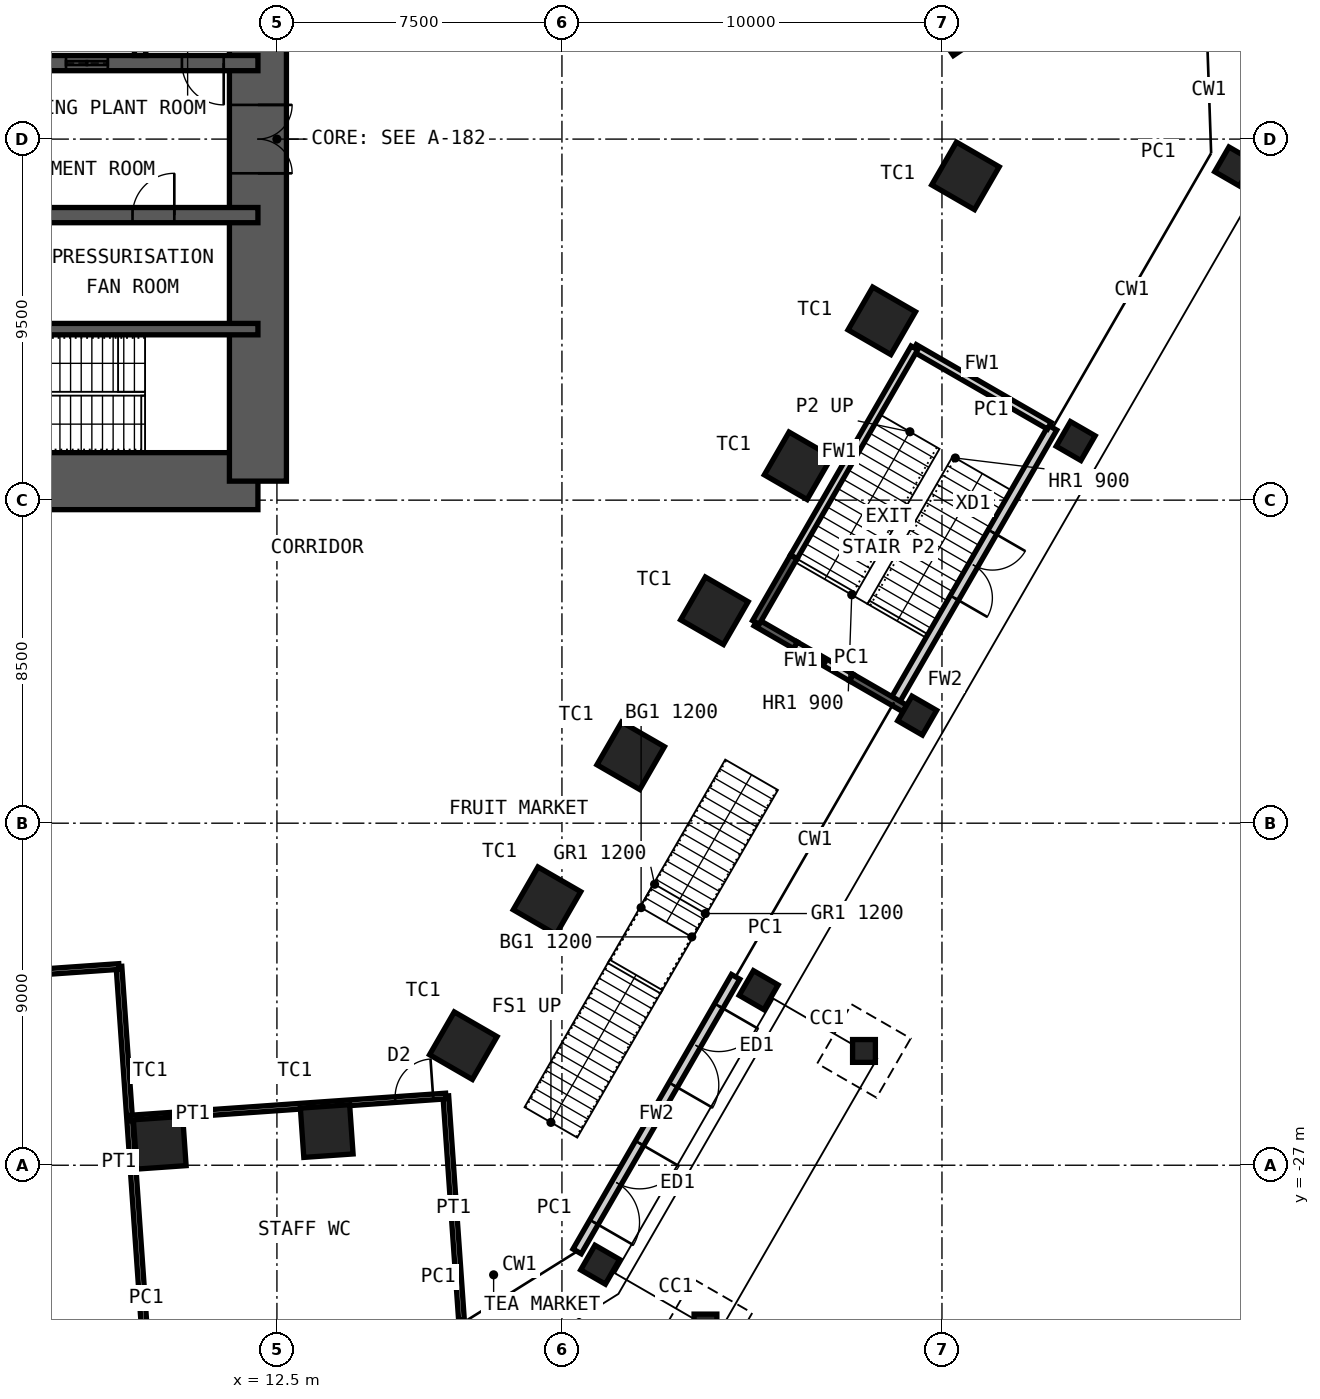
"""IFC4 building model, lengths in metres.
Left out: names, types, materials, properties, quantities, classifications, styles, units other than length and angle.
Written with IfcOpenShell. Run it as: python <this file> out.ifc"""

import sys

from ifc_helpers import new_model, si_unit, direction, frame, frame_2d, origin, origin_2d, place, context, subcontext, project, spatial, rectangle, hollow_rectangle, hollow_circle, extrude, element, fill, save


model = new_model("IFC4")
c1 = context("Model", 3, precision=1e-05, world=origin(), true_north=direction((0.0, 1.0)))
c2 = subcontext(c1, "Body", "Model", "MODEL_VIEW")
j1 = project(units=[si_unit("LENGTHUNIT", "METRE"), si_unit("PLANEANGLEUNIT", "RADIAN")], contexts=[c1])
p1 = place(None, origin())
s1 = spatial("IfcSite", under=j1, at=p1, CompositionType="ELEMENT")
p2 = place(p1, origin())
s2 = spatial("IfcBuilding", under=s1, at=p2, CompositionType="ELEMENT")
p3 = place(p2, origin())
s3 = spatial("IfcBuildingStorey", under=s2, at=p3, CompositionType="ELEMENT", Elevation=0.0)
for number, where, z_axis, x_axis in (
    (1, (30.476, 3.101, 0.0), (0.0, 0.0, 1.0), (-0.559, 0.829, 0.0)),
    (2, (30.618, -0.967, 0.0), (0.0, 0.0, 1.0), (0.5, 0.866, 0.0)),
    (3, (28.416, -4.782, 0.0), (0.0, 0.0, 1.0), (0.5, 0.866, 0.0)),
    (4, (26.214, -8.596, 0.0), (0.0, 0.0, 1.0), (0.5, 0.866, 0.0)),
    (5, (24.011, -12.411, 0.0), (0.0, 0.0, 1.0), (0.5, 0.866, 0.0)),
    (6, (21.809, -16.225, 0.0), (0.0, 0.0, 1.0), (0.5, 0.866, 0.0)),
    (7, (19.607, -20.04, 0.0), (0.0, 0.0, 1.0), (0.5, 0.866, 0.0)),
    (8, (17.405, -23.854, 0.0), (0.0, 0.0, 1.0), (0.5, 0.866, 0.0)),
    (9, (13.811, -26.1, 0.0), (0.0, 0.0, 1.0), (0.998, 0.07, 0.0)),
    (10, (9.417, -26.407, 0.0), (0.0, 0.0, 1.0), (0.998, 0.07, 0.0)),
):
    element("IfcColumn", number, at=place(p3, frame(where, z_axis=z_axis, x_axis=x_axis)), inside=s3, PredefinedType="COLUMN", context=c2, shape_type="SweptSolid", body=[
        extrude(hollow_rectangle(XDim=1.3, YDim=1.3, WallThickness=0.1, at=origin_2d()), origin(), (0.0, 0.0, 1.0), 6.0),
    ])
for number, where, z_axis, x_axis in (
    (11, (37.689, -0.72, 0.0), (0.0, 0.0, 1.0), (0.5, 0.866, 0.0)),
    (12, (33.518, -7.945, 0.0), (0.0, 0.0, 1.0), (0.5, 0.866, 0.0)),
    (13, (29.347, -15.169, 0.0), (0.0, 0.0, 1.0), (0.5, 0.866, 0.0)),
    (14, (25.177, -22.393, 0.0), (0.0, 0.0, 1.0), (0.5, 0.866, 0.0)),
    (15, (21.006, -29.617, 0.0), (0.0, 0.0, 1.0), (0.5, 0.866, 0.0)),
):
    element("IfcColumn", number, at=place(p3, frame(where, z_axis=z_axis, x_axis=x_axis)), inside=s3, PredefinedType="COLUMN", context=c2, shape_type="SweptSolid", body=[
        extrude(hollow_rectangle(XDim=0.75, YDim=0.75, WallThickness=0.036, at=origin_2d()), origin(), (0.0, 0.0, 1.0), 6.0),
    ])
p4 = place(p3, frame((-12.0, -9.0, 0.0), z_axis=(0.0, 0.0, 1.0), x_axis=(1.0, 0.0, 0.0)))
e16 = element("IfcWall", 16, at=p4, inside=s3, PredefinedType="SHEAR", context=c2, shape_type="SweptSolid", body=[
    extrude(rectangle(XDim=24.0, YDim=1.5, at=frame_2d((12.0, 0.0))), origin(), (0.0, 0.0, 1.0), 6.0),
])
p5 = place(p4, frame((1.35, 0.0, 0.0)))
e17 = element("IfcOpeningElement", 17, at=p5, cuts=e16, PredefinedType="OPENING", context=c2, shape_type="SweptSolid", body=[
    extrude(rectangle(XDim=1.0, YDim=2.1, at=frame_2d((0.5, 1.05))), frame((0.0, 0.76, 0.0), z_axis=(0.0, -1.0, 0.0), x_axis=(1.0, 0.0, 0.0)), (0.0, 0.0, 1.0), 1.52),
])
p6 = place(p4, frame((5.325, 0.0, 0.0)))
e18 = element("IfcOpeningElement", 18, at=p6, cuts=e16, PredefinedType="OPENING", context=c2, shape_type="SweptSolid", body=[
    extrude(rectangle(XDim=1.15, YDim=2.1, at=frame_2d((0.575, 1.05))), frame((0.0, 0.76, 0.0), z_axis=(0.0, -1.0, 0.0), x_axis=(1.0, 0.0, 0.0)), (0.0, 0.0, 1.0), 1.52),
])
p7 = place(p4, frame((12.6, 0.0, 0.0)))
e19 = element("IfcOpeningElement", 19, at=p7, cuts=e16, PredefinedType="OPENING", context=c2, shape_type="SweptSolid", body=[
    extrude(rectangle(XDim=1.0, YDim=2.1, at=frame_2d((0.5, 1.05))), frame((0.0, 0.76, 0.0), z_axis=(0.0, -1.0, 0.0), x_axis=(1.0, 0.0, 0.0)), (0.0, 0.0, 1.0), 1.52),
])
p8 = place(p3, frame((12.0, -9.0, 0.0), z_axis=(0.0, 0.0, 1.0), x_axis=(0.0, 1.0, 0.0)))
e20 = element("IfcWall", 20, at=p8, inside=s3, PredefinedType="SHEAR", context=c2, shape_type="SweptSolid", body=[
    extrude(rectangle(XDim=18.0, YDim=1.5, at=frame_2d((9.0, 0.0))), origin(), (0.0, 0.0, 1.0), 6.0),
])
p9 = place(p8, frame((8.1, 0.0, 0.0)))
e21 = element("IfcOpeningElement", 21, at=p9, cuts=e20, PredefinedType="OPENING", context=c2, shape_type="SweptSolid", body=[
    extrude(rectangle(XDim=1.8, YDim=2.1, at=frame_2d((0.9, 1.05))), frame((0.0, 0.76, 0.0), z_axis=(0.0, -1.0, 0.0), x_axis=(1.0, 0.0, 0.0)), (0.0, 0.0, 1.0), 1.52),
])
p10 = place(p3, frame((-12.0, 2.0, 0.0), z_axis=(0.0, 0.0, 1.0), x_axis=(1.0, 0.0, 0.0)))
e22 = element("IfcWall", 22, at=p10, inside=s3, PredefinedType="SHEAR", context=c2, shape_type="SweptSolid", body=[
    extrude(rectangle(XDim=24.0, YDim=0.4, at=frame_2d((12.0, 0.0))), origin(), (0.0, 0.0, 1.0), 6.0),
])
p11 = place(p10, frame((2.4, 0.0, 0.0)))
e23 = element("IfcOpeningElement", 23, at=p11, cuts=e22, PredefinedType="OPENING", context=c2, shape_type="SweptSolid", body=[
    extrude(rectangle(XDim=1.1, YDim=2.1, at=frame_2d((0.55, 1.05))), frame((0.0, 0.21, 0.0), z_axis=(0.0, -1.0, 0.0), x_axis=(1.0, 0.0, 0.0)), (0.0, 0.0, 1.0), 0.42),
])
p12 = place(p10, frame((22.0, 0.0, 0.0)))
e24 = element("IfcOpeningElement", 24, at=p12, cuts=e22, PredefinedType="OPENING", context=c2, shape_type="SweptSolid", body=[
    extrude(rectangle(XDim=1.1, YDim=2.1, at=frame_2d((0.55, 1.05))), frame((0.0, 0.21, 0.0), z_axis=(0.0, -1.0, 0.0), x_axis=(1.0, 0.0, 0.0)), (0.0, 0.0, 1.0), 0.42),
])
p13 = place(p10, frame((10.15, 0.0, 0.0)))
e25 = element("IfcOpeningElement", 25, at=p13, cuts=e22, PredefinedType="OPENING", context=c2, shape_type="SweptSolid", body=[
    extrude(rectangle(XDim=1.0, YDim=2.1, at=frame_2d((0.5, 1.05))), frame((0.0, 0.21, 0.0), z_axis=(0.0, -1.0, 0.0), x_axis=(1.0, 0.0, 0.0)), (0.0, 0.0, 1.0), 0.42),
])
p14 = place(p10, frame((6.7, 0.0, 0.0)))
e26 = element("IfcOpeningElement", 26, at=p14, cuts=e22, PredefinedType="OPENING", context=c2, shape_type="SweptSolid", body=[
    extrude(rectangle(XDim=1.4, YDim=2.4, at=frame_2d((0.7, 1.2))), frame((0.0, 0.21, 0.0), z_axis=(0.0, -1.0, 0.0), x_axis=(1.0, 0.0, 0.0)), (0.0, 0.0, 1.0), 0.42),
])
p15 = place(p10, frame((13.35, 0.0, 0.0)))
e27 = element("IfcOpeningElement", 27, at=p15, cuts=e22, PredefinedType="OPENING", context=c2, shape_type="SweptSolid", body=[
    extrude(rectangle(XDim=1.1, YDim=2.4, at=frame_2d((0.55, 1.2))), frame((0.0, 0.21, 0.0), z_axis=(0.0, -1.0, 0.0), x_axis=(1.0, 0.0, 0.0)), (0.0, 0.0, 1.0), 0.42),
])
p16 = place(p10, frame((16.15, 0.0, 0.0)))
e28 = element("IfcOpeningElement", 28, at=p16, cuts=e22, PredefinedType="OPENING", context=c2, shape_type="SweptSolid", body=[
    extrude(rectangle(XDim=1.1, YDim=2.4, at=frame_2d((0.55, 1.2))), frame((0.0, 0.21, 0.0), z_axis=(0.0, -1.0, 0.0), x_axis=(1.0, 0.0, 0.0)), (0.0, 0.0, 1.0), 0.42),
])
p17 = place(p10, frame((18.95, 0.0, 0.0)))
e29 = element("IfcOpeningElement", 29, at=p17, cuts=e22, PredefinedType="OPENING", context=c2, shape_type="SweptSolid", body=[
    extrude(rectangle(XDim=1.1, YDim=2.4, at=frame_2d((0.55, 1.2))), frame((0.0, 0.21, 0.0), z_axis=(0.0, -1.0, 0.0), x_axis=(1.0, 0.0, 0.0)), (0.0, 0.0, 1.0), 0.42),
])
p18 = place(p3, frame((-12.0, -2.0, 0.0), z_axis=(0.0, 0.0, 1.0), x_axis=(1.0, 0.0, 0.0)))
e30 = element("IfcWall", 30, at=p18, inside=s3, PredefinedType="SHEAR", context=c2, shape_type="SweptSolid", body=[
    extrude(rectangle(XDim=24.0, YDim=0.4, at=frame_2d((12.0, 0.0))), origin(), (0.0, 0.0, 1.0), 6.0),
])
p19 = place(p18, frame((1.1, 0.0, 0.0)))
e31 = element("IfcOpeningElement", 31, at=p19, cuts=e30, PredefinedType="OPENING", context=c2, shape_type="SweptSolid", body=[
    extrude(rectangle(XDim=1.1, YDim=2.1, at=frame_2d((0.55, 1.05))), frame((0.0, 0.21, 0.0), z_axis=(0.0, -1.0, 0.0), x_axis=(1.0, 0.0, 0.0)), (0.0, 0.0, 1.0), 0.42),
])
p20 = place(p18, frame((13.55, 0.0, 0.0)))
e32 = element("IfcOpeningElement", 32, at=p20, cuts=e30, PredefinedType="OPENING", context=c2, shape_type="SweptSolid", body=[
    extrude(rectangle(XDim=1.1, YDim=2.1, at=frame_2d((0.55, 1.05))), frame((0.0, 0.21, 0.0), z_axis=(0.0, -1.0, 0.0), x_axis=(1.0, 0.0, 0.0)), (0.0, 0.0, 1.0), 0.42),
])
p21 = place(p18, frame((20.7, 0.0, 0.0)))
e33 = element("IfcOpeningElement", 33, at=p21, cuts=e30, PredefinedType="OPENING", context=c2, shape_type="SweptSolid", body=[
    extrude(rectangle(XDim=1.1, YDim=2.1, at=frame_2d((0.55, 1.05))), frame((0.0, 0.21, 0.0), z_axis=(0.0, -1.0, 0.0), x_axis=(1.0, 0.0, 0.0)), (0.0, 0.0, 1.0), 0.42),
])
p22 = place(p18, frame((3.95, 0.0, 0.0)))
e34 = element("IfcOpeningElement", 34, at=p22, cuts=e30, PredefinedType="OPENING", context=c2, shape_type="SweptSolid", body=[
    extrude(rectangle(XDim=1.1, YDim=2.4, at=frame_2d((0.55, 1.2))), frame((0.0, 0.21, 0.0), z_axis=(0.0, -1.0, 0.0), x_axis=(1.0, 0.0, 0.0)), (0.0, 0.0, 1.0), 0.42),
])
p23 = place(p18, frame((6.75, 0.0, 0.0)))
e35 = element("IfcOpeningElement", 35, at=p23, cuts=e30, PredefinedType="OPENING", context=c2, shape_type="SweptSolid", body=[
    extrude(rectangle(XDim=1.1, YDim=2.4, at=frame_2d((0.55, 1.2))), frame((0.0, 0.21, 0.0), z_axis=(0.0, -1.0, 0.0), x_axis=(1.0, 0.0, 0.0)), (0.0, 0.0, 1.0), 0.42),
])
p24 = place(p18, frame((9.55, 0.0, 0.0)))
e36 = element("IfcOpeningElement", 36, at=p24, cuts=e30, PredefinedType="OPENING", context=c2, shape_type="SweptSolid", body=[
    extrude(rectangle(XDim=1.1, YDim=2.4, at=frame_2d((0.55, 1.2))), frame((0.0, 0.21, 0.0), z_axis=(0.0, -1.0, 0.0), x_axis=(1.0, 0.0, 0.0)), (0.0, 0.0, 1.0), 0.42),
])
p25 = place(p3, frame((-12.0, -5.0, 0.0), z_axis=(0.0, 0.0, 1.0), x_axis=(1.0, 0.0, 0.0)))
e37 = element("IfcWall", 37, at=p25, inside=s3, PredefinedType="SHEAR", context=c2, shape_type="SweptSolid", body=[
    extrude(rectangle(XDim=24.0, YDim=0.3, at=frame_2d((12.0, 0.0))), origin(), (0.0, 0.0, 1.0), 6.0),
])
p26 = place(p3, frame((8.9, 2.2, 0.0), z_axis=(0.0, 0.0, 1.0), x_axis=(0.0, 1.0, 0.0)))
e38 = element("IfcWall", 38, at=p26, inside=s3, PredefinedType="PARTITIONING", context=c2, shape_type="SweptSolid", body=[
    extrude(rectangle(XDim=2.65, YDim=0.3, at=frame_2d((1.325, 0.0))), origin(), (0.0, 0.0, 1.0), 5.78),
])
p27 = place(p3, frame((32.912, -7.595, 0.0), z_axis=(0.0, 0.0, 1.0), x_axis=(-0.500004511595, -0.866022798998, 0.0)))
e39 = element("IfcWall", 39, at=p27, inside=s3, PredefinedType="SOLIDWALL", context=c2, shape_type="SweptSolid", body=[
    extrude(rectangle(XDim=8.342, YDim=0.25, at=frame_2d((4.171, 0.0))), origin(), (0.0, 0.0, 1.0), 5.75),
])
p28 = place(p27, frame((3.171, 0.0, 0.0)))
e40 = element("IfcOpeningElement", 40, at=p28, cuts=e39, PredefinedType="OPENING", context=c2, shape_type="SweptSolid", body=[
    extrude(rectangle(XDim=2.0, YDim=2.4, at=frame_2d((1.0, 1.2))), frame((0.0, 0.135, 0.0), z_axis=(0.0, -1.0, 0.0), x_axis=(1.0, 0.0, 0.0)), (0.0, 0.0, 1.0), 0.27),
])
p29 = place(p3, frame((24.57, -22.043, 0.0), z_axis=(0.0, 0.0, 1.0), x_axis=(-0.500004511595, -0.866022798998, 0.0)))
e41 = element("IfcWall", 41, at=p29, inside=s3, PredefinedType="SOLIDWALL", context=c2, shape_type="SweptSolid", body=[
    extrude(rectangle(XDim=8.342, YDim=0.25, at=frame_2d((4.171, 0.0))), origin(), (0.0, 0.0, 1.0), 5.75),
])
p30 = place(p29, frame((0.885, 0.0, 0.0)))
e42 = element("IfcOpeningElement", 42, at=p30, cuts=e41, PredefinedType="OPENING", context=c2, shape_type="SweptSolid", body=[
    extrude(rectangle(XDim=2.4, YDim=3.0, at=frame_2d((1.2, 1.5))), frame((0.0, 0.135, 0.0), z_axis=(0.0, -1.0, 0.0), x_axis=(1.0, 0.0, 0.0)), (0.0, 0.0, 1.0), 0.27),
])
p31 = place(p29, frame((5.056, 0.0, 0.0)))
e43 = element("IfcOpeningElement", 43, at=p31, cuts=e41, PredefinedType="OPENING", context=c2, shape_type="SweptSolid", body=[
    extrude(rectangle(XDim=2.4, YDim=3.0, at=frame_2d((1.2, 1.5))), frame((0.0, 0.135, 0.0), z_axis=(0.0, -1.0, 0.0), x_axis=(1.0, 0.0, 0.0)), (0.0, 0.0, 1.0), 0.27),
])
p32 = place(p3, frame((9.034, -31.647, 0.0), z_axis=(0.0, 0.0, 1.0), x_axis=(-0.069739801019, 0.99756521599, 0.0)))
e44 = element("IfcWall", 44, at=p32, inside=s3, PredefinedType="PARTITIONING", context=c2, shape_type="SweptSolid", body=[
    extrude(rectangle(XDim=9.9, YDim=0.15, at=frame_2d((4.95, 0.0))), origin(), (0.0, 0.0, 1.0), 4.65),
])
p33 = place(p3, frame((8.344, -21.771, 0.0), z_axis=(0.0, 0.0, 1.0), x_axis=(-0.997563959397, -0.069757773133, 0.0)))
e45 = element("IfcWall", 45, at=p33, inside=s3, PredefinedType="PARTITIONING", context=c2, shape_type="SweptSolid", body=[
    extrude(rectangle(XDim=16.684, YDim=0.15, at=frame_2d((8.342, 0.0))), origin(), (0.0, 0.0, 1.0), 5.75),
])
p34 = place(p33, frame((7.442, 0.0, 0.0)))
e46 = element("IfcOpeningElement", 46, at=p34, cuts=e45, PredefinedType="OPENING", context=c2, shape_type="SweptSolid", body=[
    extrude(rectangle(XDim=1.8, YDim=2.4, at=frame_2d((0.9, 1.2))), frame((0.0, 0.085, 0.0), z_axis=(0.0, -1.0, 0.0), x_axis=(1.0, 0.0, 0.0)), (0.0, 0.0, 1.0), 0.17),
])
p35 = place(p3, frame((17.356, -31.065, 0.0), z_axis=(0.0, 0.0, 1.0), x_axis=(-0.069767771051, 0.997563260211, 0.0)))
e47 = element("IfcWall", 47, at=p35, inside=s3, PredefinedType="PARTITIONING", context=c2, shape_type="SweptSolid", body=[
    extrude(rectangle(XDim=5.9, YDim=0.15, at=frame_2d((2.95, 0.0))), origin(), (0.0, 0.0, 1.0), 5.75),
])
p36 = place(p3, frame((16.944, -25.179, 0.0), z_axis=(0.0, 0.0, 1.0), x_axis=(-0.997564977604, -0.069743210844, 0.0)))
e48 = element("IfcWall", 48, at=p36, inside=s3, PredefinedType="PARTITIONING", context=c2, shape_type="SweptSolid", body=[
    extrude(rectangle(XDim=8.342, YDim=0.15, at=frame_2d((4.171, 0.0))), origin(), (0.0, 0.0, 1.0), 5.75),
])
p37 = place(p36, frame((0.334, 0.0, 0.0)))
e49 = element("IfcOpeningElement", 49, at=p37, cuts=e48, PredefinedType="OPENING", context=c2, shape_type="SweptSolid", body=[
    extrude(rectangle(XDim=1.0, YDim=2.4, at=frame_2d((0.5, 1.2))), frame((0.0, 0.085, 0.0), z_axis=(0.0, -1.0, 0.0), x_axis=(1.0, 0.0, 0.0)), (0.0, 0.0, 1.0), 0.17),
])
p38 = place(p3, frame((32.825, -7.545, 0.0), z_axis=(0.0, 0.0, 1.0), x_axis=(-0.8660249478, 0.500000789788, 0.0)))
e50 = element("IfcWall", 50, at=p38, inside=s3, PredefinedType="PARTITIONING", context=c2, shape_type="SweptSolid", body=[
    extrude(rectangle(XDim=4.1, YDim=0.2, at=frame_2d((2.05, 0.0))), origin(), (0.0, 0.0, 1.0), 5.75),
])
p39 = place(p3, frame((29.023, -14.981, 0.0), z_axis=(0.0, 0.0, 1.0), x_axis=(-0.866015446554, 0.500017246033, 0.0)))
e51 = element("IfcWall", 51, at=p39, inside=s3, PredefinedType="PARTITIONING", context=c2, shape_type="SweptSolid", body=[
    extrude(rectangle(XDim=1.625, YDim=0.2, at=frame_2d((0.812, 0.0))), origin(), (0.0, 0.0, 1.0), 5.75),
])
p40 = place(p3, frame((29.275, -5.495, 0.0), z_axis=(0.0, 0.0, 1.0), x_axis=(-0.499976503915, -0.866038968831, 0.0)))
e52 = element("IfcWall", 52, at=p40, inside=s3, PredefinedType="PARTITIONING", context=c2, shape_type="SweptSolid", body=[
    extrude(rectangle(XDim=6.35, YDim=0.2, at=frame_2d((3.175, 0.0))), origin(), (0.0, 0.0, 1.0), 5.75),
])
p41 = place(p3, frame((27.615, -14.169, 0.0), z_axis=(0.0, 0.0, 1.0), x_axis=(-0.866087547558, 0.499892348375, 0.0)))
e53 = element("IfcWall", 53, at=p41, inside=s3, PredefinedType="PARTITIONING", context=c2, shape_type="SweptSolid", body=[
    extrude(rectangle(XDim=1.7, YDim=0.2, at=frame_2d((0.85, 0.0))), origin(), (0.0, 0.0, 1.0), 5.75),
])
p42 = place(p3, frame((26.143, -13.319, 0.0), z_axis=(0.0, 0.0, 1.0), x_axis=(-0.865955154139, 0.50012165622, 0.0)))
e54 = element("IfcWall", 54, at=p42, inside=s3, PredefinedType="PARTITIONING", context=c2, shape_type="SweptSolid", body=[
    extrude(rectangle(XDim=1.2, YDim=0.2, at=frame_2d((0.6, 0.0))), origin(), (0.0, 0.0, 1.0), 5.75),
])
p43 = place(p3, frame((26.1, -10.994, 0.0), z_axis=(0.0, 0.0, 1.0), x_axis=(-0.500001870701, -0.866024323732, 0.0)))
e55 = element("IfcWall", 55, at=p43, inside=s3, PredefinedType="PARTITIONING", context=c2, shape_type="SweptSolid", body=[
    extrude(rectangle(XDim=1.992, YDim=0.2, at=frame_2d((0.996, 0.0))), origin(), (0.0, 0.0, 1.0), 5.75),
])
for number, where, z_axis, x_axis in (
    (56, (27.948, -23.993, -0.3), (0.0, 0.0, 1.0), (1.0, 0.0, 0.0)),
    (57, (23.777, -31.217, -0.3), (0.0, 0.0, 1.0), (1.0, 0.0, 0.0)),
):
    element("IfcColumn", number, at=place(p3, frame(where, z_axis=z_axis, x_axis=x_axis)), inside=s3, PredefinedType="COLUMN", context=c2, shape_type="SweptSolid", body=[
        extrude(hollow_circle(Radius=0.162, WallThickness=0.012, at=origin_2d()), origin(), (0.0, 0.0, 1.0), 4.46),
    ])
p44 = place(p28, origin())
e58 = element("IfcDoor", 58, at=p44, inside=s3, OperationType="DOUBLE_DOOR_DOUBLE_SWING", PredefinedType="DOOR", context=c2, shape_type="SweptSolid", body=[
    extrude(rectangle(XDim=2.0, YDim=2.4, at=frame_2d((1.0, 1.2))), frame((0.0, 0.025, 0.0), z_axis=(0.0, -1.0, 0.0), x_axis=(1.0, 0.0, 0.0)), (0.0, 0.0, 1.0), 0.05),
])
fill(e40, e58)
p45 = place(p30, origin())
e59 = element("IfcDoor", 59, at=p45, inside=s3, OperationType="DOUBLE_DOOR_DOUBLE_SWING", PredefinedType="DOOR", context=c2, shape_type="SweptSolid", body=[
    extrude(rectangle(XDim=2.4, YDim=3.0, at=frame_2d((1.2, 1.5))), frame((0.0, 0.025, 0.0), z_axis=(0.0, -1.0, 0.0), x_axis=(1.0, 0.0, 0.0)), (0.0, 0.0, 1.0), 0.05),
])
fill(e42, e59)
p46 = place(p31, origin())
e60 = element("IfcDoor", 60, at=p46, inside=s3, OperationType="DOUBLE_DOOR_DOUBLE_SWING", PredefinedType="DOOR", context=c2, shape_type="SweptSolid", body=[
    extrude(rectangle(XDim=2.4, YDim=3.0, at=frame_2d((1.2, 1.5))), frame((0.0, 0.025, 0.0), z_axis=(0.0, -1.0, 0.0), x_axis=(1.0, 0.0, 0.0)), (0.0, 0.0, 1.0), 0.05),
])
fill(e43, e60)
p47 = place(p12, origin())
e61 = element("IfcDoor", 61, at=p47, inside=s3, OperationType="SINGLE_SWING_RIGHT", PredefinedType="DOOR", context=c2, shape_type="SweptSolid", body=[
    extrude(rectangle(XDim=1.1, YDim=2.1, at=frame_2d((0.55, 1.05))), frame((0.0, 0.025, 0.0), z_axis=(0.0, -1.0, 0.0), x_axis=(1.0, 0.0, 0.0)), (0.0, 0.0, 1.0), 0.05),
])
fill(e24, e61)
p48 = place(p21, origin())
e62 = element("IfcDoor", 62, at=p48, inside=s3, OperationType="SINGLE_SWING_LEFT", PredefinedType="DOOR", context=c2, shape_type="SweptSolid", body=[
    extrude(rectangle(XDim=1.1, YDim=2.1, at=frame_2d((0.55, 1.05))), frame((0.0, 0.025, 0.0), z_axis=(0.0, -1.0, 0.0), x_axis=(1.0, 0.0, 0.0)), (0.0, 0.0, 1.0), 0.05),
])
fill(e33, e62)
p49 = place(p9, origin())
e63 = element("IfcDoor", 63, at=p49, inside=s3, OperationType="DOUBLE_DOOR_DOUBLE_SWING", PredefinedType="DOOR", context=c2, shape_type="SweptSolid", body=[
    extrude(rectangle(XDim=1.8, YDim=2.1, at=frame_2d((0.9, 1.05))), frame((0.0, 0.025, 0.0), z_axis=(0.0, -1.0, 0.0), x_axis=(1.0, 0.0, 0.0)), (0.0, 0.0, 1.0), 0.05),
])
fill(e21, e63)
p50 = place(p17, origin())
e64 = element("IfcDoor", 64, at=p50, inside=s3, OperationType="DOUBLE_DOOR_SLIDING", PredefinedType="DOOR", context=c2, shape_type="SweptSolid", body=[
    extrude(rectangle(XDim=1.1, YDim=2.4, at=frame_2d((0.55, 1.2))), frame((0.0, 0.025, 0.0), z_axis=(0.0, -1.0, 0.0), x_axis=(1.0, 0.0, 0.0)), (0.0, 0.0, 1.0), 0.05),
])
fill(e29, e64)
p51 = place(p37, origin())
e65 = element("IfcDoor", 65, at=p51, inside=s3, OperationType="SINGLE_SWING_LEFT", PredefinedType="DOOR", context=c2, shape_type="SweptSolid", body=[
    extrude(rectangle(XDim=1.0, YDim=2.4, at=frame_2d((0.5, 1.2))), frame((0.0, 0.025, 0.0), z_axis=(0.0, -1.0, 0.0), x_axis=(1.0, 0.0, 0.0)), (0.0, 0.0, 1.0), 0.05),
])
fill(e49, e65)
save(model, sys.argv[1])
